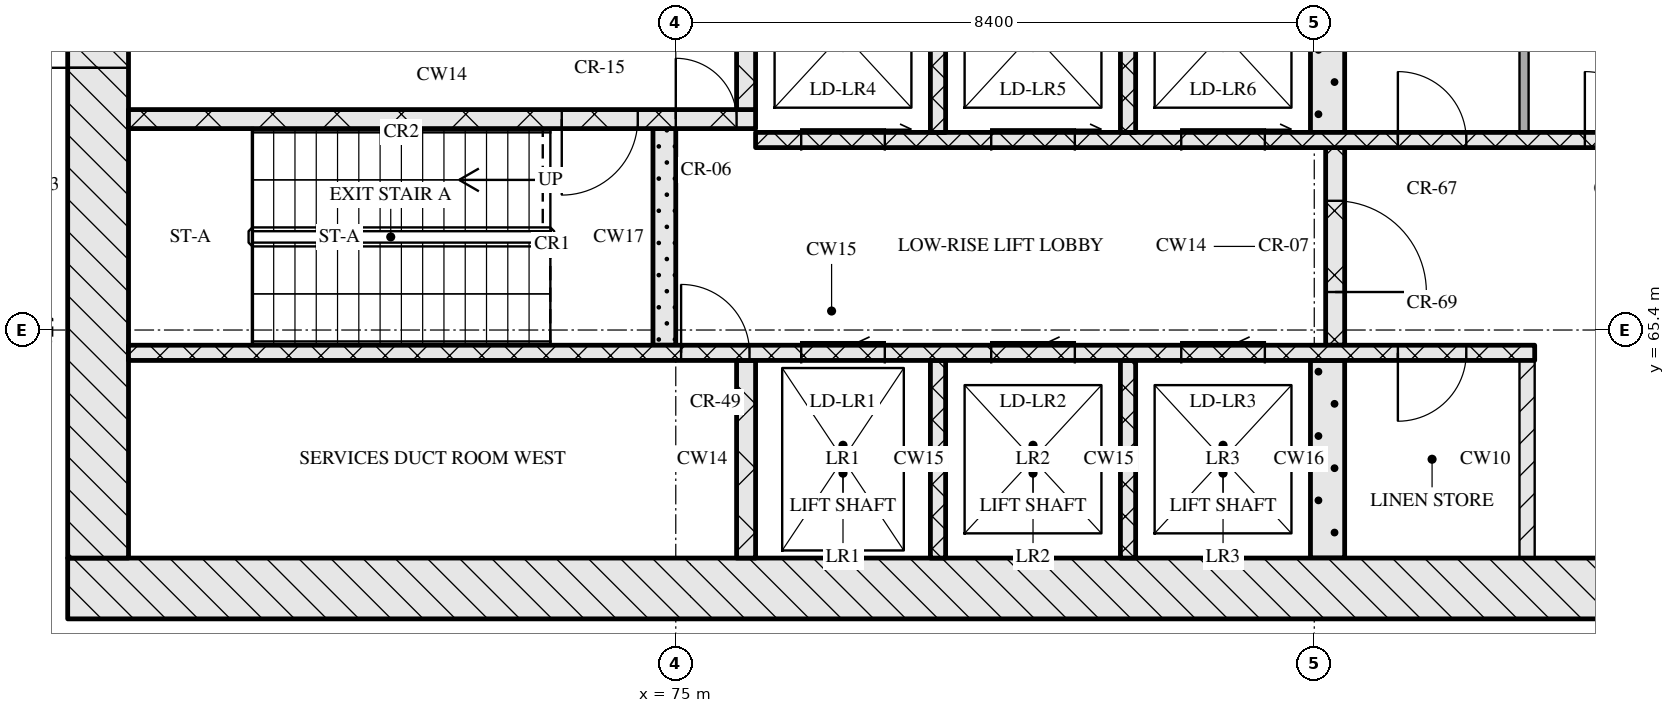
"""IFC4 building model, lengths in metres.
Left out: names, types, materials, properties, quantities, classifications, styles, units other than length and angle.
Written with IfcOpenShell. Run it as: python <this file> out.ifc"""

import sys

from ifc_helpers import new_model, si_unit, direction, frame, frame_2d, origin, place, context, subcontext, project, spatial, rectangle, extrude, element, fill, save


model = new_model("IFC4")
c1 = context("Model", 3, precision=1e-05, world=origin(), true_north=direction((0.0, 1.0)))
c2 = subcontext(c1, "Body", "Model", "MODEL_VIEW")
j1 = project(units=[si_unit("LENGTHUNIT", "METRE"), si_unit("PLANEANGLEUNIT", "RADIAN")], contexts=[c1])
p1 = place(None, origin())
s1 = spatial("IfcSite", under=j1, at=p1, CompositionType="ELEMENT")
p2 = place(p1, origin())
s2 = spatial("IfcBuilding", under=s1, at=p2, CompositionType="ELEMENT")
p3 = place(p2, frame((0.0, 0.0, 142.05)))
s3 = spatial("IfcBuildingStorey", under=s2, at=p3, CompositionType="ELEMENT", Elevation=142.05)
p4 = place(p3, frame((67.0, 62.0, 0.0), z_axis=(0.0, 0.0, 1.0), x_axis=(1.0, 0.0, 0.0)))
e1 = element("IfcWall", 1, at=p4, inside=s3, PredefinedType="SOLIDWALL", context=c2, shape_type="SweptSolid", body=[
    extrude(rectangle(XDim=41.2, YDim=0.8, at=frame_2d((20.6, 0.0))), origin(), (0.0, 0.0, 1.0), 5.12),
])
p5 = place(p4, frame((20.95, 0.0, 0.0)))
e2 = element("IfcOpeningElement", 2, at=p5, cuts=e1, PredefinedType="OPENING", context=c2, shape_type="SweptSolid", body=[
    extrude(rectangle(XDim=1.8, YDim=2.1, at=frame_2d((0.9, 1.05))), frame((0.0, 0.41, 0.0), z_axis=(0.0, -1.0, 0.0), x_axis=(1.0, 0.0, 0.0)), (0.0, 0.0, 1.0), 0.82),
])
p6 = place(p3, frame((67.4, 62.4, 0.0), z_axis=(0.0, 0.0, 1.0), x_axis=(0.0, 1.0, 0.0)))
e3 = element("IfcWall", 3, at=p6, inside=s3, PredefinedType="SOLIDWALL", context=c2, shape_type="SweptSolid", body=[
    extrude(rectangle(XDim=12.0, YDim=0.8, at=frame_2d((6.0, 0.0))), origin(), (0.0, 0.0, 1.0), 5.12),
])
p7 = place(p6, frame((6.45, 0.0, 0.0)))
e4 = element("IfcOpeningElement", 4, at=p7, cuts=e3, PredefinedType="OPENING", context=c2, shape_type="SweptSolid", body=[
    extrude(rectangle(XDim=1.2, YDim=2.1, at=frame_2d((0.6, 1.05))), frame((0.0, 0.41, 0.0), z_axis=(0.0, -1.0, 0.0), x_axis=(1.0, 0.0, 0.0)), (0.0, 0.0, 1.0), 0.82),
])
p8 = place(p3, frame((75.925, 62.4, 0.0), z_axis=(0.0, 0.0, 1.0), x_axis=(0.0, 1.0, 0.0)))
e5 = element("IfcWall", 5, at=p8, inside=s3, PredefinedType="SOLIDWALL", context=c2, shape_type="SweptSolid", body=[
    extrude(rectangle(XDim=2.6, YDim=0.25, at=frame_2d((1.3, 0.0))), origin(), (0.0, 0.0, 1.0), 5.12),
])
for number, where, z_axis, x_axis in (
    (6, (78.45, 62.4, 0.0), (0.0, 0.0, 1.0), (0.0, 1.0, 0.0)),
    (7, (80.95, 62.4, 0.0), (0.0, 0.0, 1.0), (0.0, 1.0, 0.0)),
):
    element("IfcWall", number, at=place(p3, frame(where, z_axis=z_axis, x_axis=x_axis)), inside=s3, PredefinedType="SOLIDWALL", context=c2, shape_type="SweptSolid", body=[
        extrude(rectangle(XDim=2.6, YDim=0.2, at=frame_2d((1.3, 0.0))), origin(), (0.0, 0.0, 1.0), 5.12),
    ])
p9 = place(p3, frame((83.575, 62.4, 0.0), z_axis=(0.0, 0.0, 1.0), x_axis=(0.0, 1.0, 0.0)))
e8 = element("IfcWall", 8, at=p9, inside=s3, PredefinedType="SOLIDWALL", context=c2, shape_type="SweptSolid", body=[
    extrude(rectangle(XDim=2.6, YDim=0.45, at=frame_2d((1.3, 0.0))), origin(), (0.0, 0.0, 1.0), 5.12),
])
p10 = place(p3, frame((86.2, 62.4, 0.0), z_axis=(0.0, 0.0, 1.0), x_axis=(0.0, 1.0, 0.0)))
e9 = element("IfcWall", 9, at=p10, inside=s3, PredefinedType="PARTITIONING", context=c2, shape_type="SweptSolid", body=[
    extrude(rectangle(XDim=2.6, YDim=0.2, at=frame_2d((1.3, 0.0))), origin(), (0.0, 0.0, 1.0), 5.12),
])
p11 = place(p3, frame((67.8, 65.1, 0.0), z_axis=(0.0, 0.0, 1.0), x_axis=(1.0, 0.0, 0.0)))
e10 = element("IfcWall", 10, at=p11, inside=s3, PredefinedType="SOLIDWALL", context=c2, shape_type="SweptSolid", body=[
    extrude(rectangle(XDim=18.5, YDim=0.2, at=frame_2d((9.25, 0.0))), origin(), (0.0, 0.0, 1.0), 5.12),
])
p12 = place(p11, frame((7.27, 0.0, 0.0)))
e11 = element("IfcOpeningElement", 11, at=p12, cuts=e10, PredefinedType="OPENING", context=c2, shape_type="SweptSolid", body=[
    extrude(rectangle(XDim=0.9, YDim=2.1, at=frame_2d((0.45, 1.05))), frame((0.0, 0.11, 0.0), z_axis=(0.0, -1.0, 0.0), x_axis=(1.0, 0.0, 0.0)), (0.0, 0.0, 1.0), 0.22),
])
p13 = place(p11, frame((8.85, 0.0, 0.0)))
e12 = element("IfcOpeningElement", 12, at=p13, cuts=e10, PredefinedType="OPENING", context=c2, shape_type="SweptSolid", body=[
    extrude(rectangle(XDim=1.1, YDim=2.1, at=frame_2d((0.55, 1.05))), frame((0.0, 0.11, 0.0), z_axis=(0.0, -1.0, 0.0), x_axis=(1.0, 0.0, 0.0)), (0.0, 0.0, 1.0), 0.22),
])
p14 = place(p11, frame((11.35, 0.0, 0.0)))
e13 = element("IfcOpeningElement", 13, at=p14, cuts=e10, PredefinedType="OPENING", context=c2, shape_type="SweptSolid", body=[
    extrude(rectangle(XDim=1.1, YDim=2.1, at=frame_2d((0.55, 1.05))), frame((0.0, 0.11, 0.0), z_axis=(0.0, -1.0, 0.0), x_axis=(1.0, 0.0, 0.0)), (0.0, 0.0, 1.0), 0.22),
])
p15 = place(p11, frame((13.85, 0.0, 0.0)))
e14 = element("IfcOpeningElement", 14, at=p15, cuts=e10, PredefinedType="OPENING", context=c2, shape_type="SweptSolid", body=[
    extrude(rectangle(XDim=1.1, YDim=2.1, at=frame_2d((0.55, 1.05))), frame((0.0, 0.11, 0.0), z_axis=(0.0, -1.0, 0.0), x_axis=(1.0, 0.0, 0.0)), (0.0, 0.0, 1.0), 0.22),
])
p16 = place(p11, frame((16.7, 0.0, 0.0)))
e15 = element("IfcOpeningElement", 15, at=p16, cuts=e10, PredefinedType="OPENING", context=c2, shape_type="SweptSolid", body=[
    extrude(rectangle(XDim=0.9, YDim=2.1, at=frame_2d((0.45, 1.05))), frame((0.0, 0.11, 0.0), z_axis=(0.0, -1.0, 0.0), x_axis=(1.0, 0.0, 0.0)), (0.0, 0.0, 1.0), 0.22),
])
p17 = place(p3, frame((74.85, 65.2, 0.0), z_axis=(0.0, 0.0, 1.0), x_axis=(0.0, 1.0, 0.0)))
e16 = element("IfcWall", 16, at=p17, inside=s3, PredefinedType="SOLIDWALL", context=c2, shape_type="SweptSolid", body=[
    extrude(rectangle(XDim=2.85, YDim=0.3, at=frame_2d((1.425, 0.0))), origin(), (0.0, 0.0, 1.0), 5.12),
])
p18 = place(p3, frame((83.675, 65.2, 0.0), z_axis=(0.0, 0.0, 1.0), x_axis=(0.0, 1.0, 0.0)))
e17 = element("IfcWall", 17, at=p18, inside=s3, PredefinedType="SOLIDWALL", context=c2, shape_type="SweptSolid", body=[
    extrude(rectangle(XDim=2.6, YDim=0.25, at=frame_2d((1.3, 0.0))), origin(), (0.0, 0.0, 1.0), 5.12),
])
p19 = place(p18, frame((0.7, 0.0, 0.0)))
e18 = element("IfcOpeningElement", 18, at=p19, cuts=e17, PredefinedType="OPENING", context=c2, shape_type="SweptSolid", body=[
    extrude(rectangle(XDim=1.2, YDim=2.1, at=frame_2d((0.6, 1.05))), frame((0.0, 0.135, 0.0), z_axis=(0.0, -1.0, 0.0), x_axis=(1.0, 0.0, 0.0)), (0.0, 0.0, 1.0), 0.27),
])
p20 = place(p3, frame((76.05, 67.9, 0.0), z_axis=(0.0, 0.0, 1.0), x_axis=(1.0, 0.0, 0.0)))
e19 = element("IfcWall", 19, at=p20, inside=s3, PredefinedType="SOLIDWALL", context=c2, shape_type="SweptSolid", body=[
    extrude(rectangle(XDim=23.1, YDim=0.2, at=frame_2d((11.55, 0.0))), origin(), (0.0, 0.0, 1.0), 5.12),
])
p21 = place(p20, frame((0.6, 0.0, 0.0)))
e20 = element("IfcOpeningElement", 20, at=p21, cuts=e19, PredefinedType="OPENING", context=c2, shape_type="SweptSolid", body=[
    extrude(rectangle(XDim=1.1, YDim=2.1, at=frame_2d((0.55, 1.05))), frame((0.0, 0.11, 0.0), z_axis=(0.0, -1.0, 0.0), x_axis=(1.0, 0.0, 0.0)), (0.0, 0.0, 1.0), 0.22),
])
p22 = place(p20, frame((3.1, 0.0, 0.0)))
e21 = element("IfcOpeningElement", 21, at=p22, cuts=e19, PredefinedType="OPENING", context=c2, shape_type="SweptSolid", body=[
    extrude(rectangle(XDim=1.1, YDim=2.1, at=frame_2d((0.55, 1.05))), frame((0.0, 0.11, 0.0), z_axis=(0.0, -1.0, 0.0), x_axis=(1.0, 0.0, 0.0)), (0.0, 0.0, 1.0), 0.22),
])
p23 = place(p20, frame((5.6, 0.0, 0.0)))
e22 = element("IfcOpeningElement", 22, at=p23, cuts=e19, PredefinedType="OPENING", context=c2, shape_type="SweptSolid", body=[
    extrude(rectangle(XDim=1.1, YDim=2.1, at=frame_2d((0.55, 1.05))), frame((0.0, 0.11, 0.0), z_axis=(0.0, -1.0, 0.0), x_axis=(1.0, 0.0, 0.0)), (0.0, 0.0, 1.0), 0.22),
])
p24 = place(p20, frame((8.45, 0.0, 0.0)))
e23 = element("IfcOpeningElement", 23, at=p24, cuts=e19, PredefinedType="OPENING", context=c2, shape_type="SweptSolid", body=[
    extrude(rectangle(XDim=0.9, YDim=2.1, at=frame_2d((0.45, 1.05))), frame((0.0, 0.11, 0.0), z_axis=(0.0, -1.0, 0.0), x_axis=(1.0, 0.0, 0.0)), (0.0, 0.0, 1.0), 0.22),
])
p25 = place(p20, frame((10.91, 0.0, 0.0)))
e24 = element("IfcOpeningElement", 24, at=p25, cuts=e19, PredefinedType="OPENING", context=c2, shape_type="SweptSolid", body=[
    extrude(rectangle(XDim=0.9, YDim=2.1, at=frame_2d((0.45, 1.05))), frame((0.0, 0.11, 0.0), z_axis=(0.0, -1.0, 0.0), x_axis=(1.0, 0.0, 0.0)), (0.0, 0.0, 1.0), 0.22),
])
p26 = place(p20, frame((13.55, 0.0, 0.0)))
e25 = element("IfcOpeningElement", 25, at=p26, cuts=e19, PredefinedType="OPENING", context=c2, shape_type="SweptSolid", body=[
    extrude(rectangle(XDim=1.0, YDim=2.1, at=frame_2d((0.5, 1.05))), frame((0.0, 0.11, 0.0), z_axis=(0.0, -1.0, 0.0), x_axis=(1.0, 0.0, 0.0)), (0.0, 0.0, 1.0), 0.22),
])
p27 = place(p20, frame((16.2, 0.0, 0.0)))
e26 = element("IfcOpeningElement", 26, at=p27, cuts=e19, PredefinedType="OPENING", context=c2, shape_type="SweptSolid", body=[
    extrude(rectangle(XDim=1.1, YDim=2.1, at=frame_2d((0.55, 1.05))), frame((0.0, 0.11, 0.0), z_axis=(0.0, -1.0, 0.0), x_axis=(1.0, 0.0, 0.0)), (0.0, 0.0, 1.0), 0.22),
])
p28 = place(p20, frame((18.7, 0.0, 0.0)))
e27 = element("IfcOpeningElement", 27, at=p28, cuts=e19, PredefinedType="OPENING", context=c2, shape_type="SweptSolid", body=[
    extrude(rectangle(XDim=1.1, YDim=2.1, at=frame_2d((0.55, 1.05))), frame((0.0, 0.11, 0.0), z_axis=(0.0, -1.0, 0.0), x_axis=(1.0, 0.0, 0.0)), (0.0, 0.0, 1.0), 0.22),
])
p29 = place(p20, frame((21.2, 0.0, 0.0)))
e28 = element("IfcOpeningElement", 28, at=p29, cuts=e19, PredefinedType="OPENING", context=c2, shape_type="SweptSolid", body=[
    extrude(rectangle(XDim=1.1, YDim=2.1, at=frame_2d((0.55, 1.05))), frame((0.0, 0.11, 0.0), z_axis=(0.0, -1.0, 0.0), x_axis=(1.0, 0.0, 0.0)), (0.0, 0.0, 1.0), 0.22),
])
for number, where, z_axis, x_axis in (
    (29, (78.45, 68.0, 0.0), (0.0, 0.0, 1.0), (0.0, 1.0, 0.0)),
    (30, (80.95, 68.0, 0.0), (0.0, 0.0, 1.0), (0.0, 1.0, 0.0)),
):
    element("IfcWall", number, at=place(p3, frame(where, z_axis=z_axis, x_axis=x_axis)), inside=s3, PredefinedType="SOLIDWALL", context=c2, shape_type="SweptSolid", body=[
        extrude(rectangle(XDim=2.6, YDim=0.2, at=frame_2d((1.3, 0.0))), origin(), (0.0, 0.0, 1.0), 5.12),
    ])
p30 = place(p3, frame((83.575, 68.0, 0.0), z_axis=(0.0, 0.0, 1.0), x_axis=(0.0, 1.0, 0.0)))
e31 = element("IfcWall", 31, at=p30, inside=s3, PredefinedType="SOLIDWALL", context=c2, shape_type="SweptSolid", body=[
    extrude(rectangle(XDim=2.6, YDim=0.45, at=frame_2d((1.3, 0.0))), origin(), (0.0, 0.0, 1.0), 5.12),
])
p31 = place(p3, frame((86.16, 68.0, 0.0), z_axis=(0.0, 0.0, 1.0), x_axis=(0.0, 1.0, 0.0)))
e32 = element("IfcWall", 32, at=p31, inside=s3, PredefinedType="PARTITIONING", context=c2, shape_type="SweptSolid", body=[
    extrude(rectangle(XDim=2.6, YDim=0.12, at=frame_2d((1.3, 0.0))), origin(), (0.0, 0.0, 1.0), 5.12),
])
p32 = place(p3, frame((67.8, 68.175, 0.0), z_axis=(0.0, 0.0, 1.0), x_axis=(1.0, 0.0, 0.0)))
e33 = element("IfcWall", 33, at=p32, inside=s3, PredefinedType="SOLIDWALL", context=c2, shape_type="SweptSolid", body=[
    extrude(rectangle(XDim=8.25, YDim=0.25, at=frame_2d((4.125, 0.0))), origin(), (0.0, 0.0, 1.0), 5.12),
])
p33 = place(p32, frame((5.7, 0.0, 0.0)))
e34 = element("IfcOpeningElement", 34, at=p33, cuts=e33, PredefinedType="OPENING", context=c2, shape_type="SweptSolid", body=[
    extrude(rectangle(XDim=1.0, YDim=2.1, at=frame_2d((0.5, 1.05))), frame((0.0, 0.135, 0.0), z_axis=(0.0, -1.0, 0.0), x_axis=(1.0, 0.0, 0.0)), (0.0, 0.0, 1.0), 0.27),
])
p34 = place(p32, frame((7.2, 0.0, 0.0)))
e35 = element("IfcOpeningElement", 35, at=p34, cuts=e33, PredefinedType="OPENING", context=c2, shape_type="SweptSolid", body=[
    extrude(rectangle(XDim=0.8, YDim=2.1, at=frame_2d((0.4, 1.05))), frame((0.0, 0.135, 0.0), z_axis=(0.0, -1.0, 0.0), x_axis=(1.0, 0.0, 0.0)), (0.0, 0.0, 1.0), 0.27),
])
p35 = place(p3, frame((75.925, 68.3, 0.0), z_axis=(0.0, 0.0, 1.0), x_axis=(0.0, 1.0, 0.0)))
e36 = element("IfcWall", 36, at=p35, inside=s3, PredefinedType="SOLIDWALL", context=c2, shape_type="SweptSolid", body=[
    extrude(rectangle(XDim=2.3, YDim=0.25, at=frame_2d((1.15, 0.0))), origin(), (0.0, 0.0, 1.0), 5.12),
])
p36 = place(p12, origin())
e37 = element("IfcDoor", 37, at=p36, inside=s3, OperationType="SINGLE_SWING_LEFT", PredefinedType="DOOR", context=c2, shape_type="SweptSolid", body=[
    extrude(rectangle(XDim=0.9, YDim=2.1, at=frame_2d((0.45, 1.05))), frame((0.0, 0.025, 0.0), z_axis=(0.0, -1.0, 0.0), x_axis=(1.0, 0.0, 0.0)), (0.0, 0.0, 1.0), 0.05),
])
fill(e11, e37)
p37 = place(p13, origin())
e38 = element("IfcDoor", 38, at=p37, inside=s3, OperationType="SLIDING_TO_LEFT", PredefinedType="DOOR", context=c2, shape_type="SweptSolid", body=[
    extrude(rectangle(XDim=1.1, YDim=2.1, at=frame_2d((0.55, 1.05))), frame((0.0, 0.025, 0.0), z_axis=(0.0, -1.0, 0.0), x_axis=(1.0, 0.0, 0.0)), (0.0, 0.0, 1.0), 0.05),
])
fill(e12, e38)
p38 = place(p14, origin())
e39 = element("IfcDoor", 39, at=p38, inside=s3, OperationType="SLIDING_TO_LEFT", PredefinedType="DOOR", context=c2, shape_type="SweptSolid", body=[
    extrude(rectangle(XDim=1.1, YDim=2.1, at=frame_2d((0.55, 1.05))), frame((0.0, 0.025, 0.0), z_axis=(0.0, -1.0, 0.0), x_axis=(1.0, 0.0, 0.0)), (0.0, 0.0, 1.0), 0.05),
])
fill(e13, e39)
p39 = place(p15, origin())
e40 = element("IfcDoor", 40, at=p39, inside=s3, OperationType="SLIDING_TO_LEFT", PredefinedType="DOOR", context=c2, shape_type="SweptSolid", body=[
    extrude(rectangle(XDim=1.1, YDim=2.1, at=frame_2d((0.55, 1.05))), frame((0.0, 0.025, 0.0), z_axis=(0.0, -1.0, 0.0), x_axis=(1.0, 0.0, 0.0)), (0.0, 0.0, 1.0), 0.05),
])
fill(e14, e40)
p40 = place(p16, origin())
e41 = element("IfcDoor", 41, at=p40, inside=s3, OperationType="SINGLE_SWING_RIGHT", PredefinedType="DOOR", context=c2, shape_type="SweptSolid", body=[
    extrude(rectangle(XDim=0.9, YDim=2.1, at=frame_2d((0.45, 1.05))), frame((0.0, 0.025, 0.0), z_axis=(0.0, -1.0, 0.0), x_axis=(1.0, 0.0, 0.0)), (0.0, 0.0, 1.0), 0.05),
])
fill(e15, e41)
p41 = place(p19, origin())
e42 = element("IfcDoor", 42, at=p41, inside=s3, OperationType="SINGLE_SWING_RIGHT", PredefinedType="DOOR", context=c2, shape_type="SweptSolid", body=[
    extrude(rectangle(XDim=1.2, YDim=2.1, at=frame_2d((0.6, 1.05))), frame((0.0, 0.025, 0.0), z_axis=(0.0, -1.0, 0.0), x_axis=(1.0, 0.0, 0.0)), (0.0, 0.0, 1.0), 0.05),
])
fill(e18, e42)
p42 = place(p21, origin())
e43 = element("IfcDoor", 43, at=p42, inside=s3, OperationType="SLIDING_TO_RIGHT", PredefinedType="DOOR", context=c2, shape_type="SweptSolid", body=[
    extrude(rectangle(XDim=1.1, YDim=2.1, at=frame_2d((0.55, 1.05))), frame((0.0, 0.025, 0.0), z_axis=(0.0, -1.0, 0.0), x_axis=(1.0, 0.0, 0.0)), (0.0, 0.0, 1.0), 0.05),
])
fill(e20, e43)
p43 = place(p22, origin())
e44 = element("IfcDoor", 44, at=p43, inside=s3, OperationType="SLIDING_TO_RIGHT", PredefinedType="DOOR", context=c2, shape_type="SweptSolid", body=[
    extrude(rectangle(XDim=1.1, YDim=2.1, at=frame_2d((0.55, 1.05))), frame((0.0, 0.025, 0.0), z_axis=(0.0, -1.0, 0.0), x_axis=(1.0, 0.0, 0.0)), (0.0, 0.0, 1.0), 0.05),
])
fill(e21, e44)
p44 = place(p23, origin())
e45 = element("IfcDoor", 45, at=p44, inside=s3, OperationType="SLIDING_TO_RIGHT", PredefinedType="DOOR", context=c2, shape_type="SweptSolid", body=[
    extrude(rectangle(XDim=1.1, YDim=2.1, at=frame_2d((0.55, 1.05))), frame((0.0, 0.025, 0.0), z_axis=(0.0, -1.0, 0.0), x_axis=(1.0, 0.0, 0.0)), (0.0, 0.0, 1.0), 0.05),
])
fill(e22, e45)
p45 = place(p24, origin())
e46 = element("IfcDoor", 46, at=p45, inside=s3, OperationType="SINGLE_SWING_LEFT", PredefinedType="DOOR", context=c2, shape_type="SweptSolid", body=[
    extrude(rectangle(XDim=0.9, YDim=2.1, at=frame_2d((0.45, 1.05))), frame((0.0, 0.025, 0.0), z_axis=(0.0, -1.0, 0.0), x_axis=(1.0, 0.0, 0.0)), (0.0, 0.0, 1.0), 0.05),
])
fill(e23, e46)
p46 = place(p25, origin())
e47 = element("IfcDoor", 47, at=p46, inside=s3, OperationType="SINGLE_SWING_LEFT", PredefinedType="DOOR", context=c2, shape_type="SweptSolid", body=[
    extrude(rectangle(XDim=0.9, YDim=2.1, at=frame_2d((0.45, 1.05))), frame((0.0, 0.025, 0.0), z_axis=(0.0, -1.0, 0.0), x_axis=(1.0, 0.0, 0.0)), (0.0, 0.0, 1.0), 0.05),
])
fill(e24, e47)
p47 = place(p33, origin())
e48 = element("IfcDoor", 48, at=p47, inside=s3, OperationType="SINGLE_SWING_RIGHT", PredefinedType="DOOR", context=c2, shape_type="SweptSolid", body=[
    extrude(rectangle(XDim=1.0, YDim=2.1, at=frame_2d((0.5, 1.05))), frame((0.0, 0.025, 0.0), z_axis=(0.0, -1.0, 0.0), x_axis=(1.0, 0.0, 0.0)), (0.0, 0.0, 1.0), 0.05),
])
fill(e34, e48)
p48 = place(p34, origin())
e49 = element("IfcDoor", 49, at=p48, inside=s3, OperationType="SINGLE_SWING_LEFT", PredefinedType="DOOR", context=c2, shape_type="SweptSolid", body=[
    extrude(rectangle(XDim=0.8, YDim=2.1, at=frame_2d((0.4, 1.05))), frame((0.0, 0.025, 0.0), z_axis=(0.0, -1.0, 0.0), x_axis=(1.0, 0.0, 0.0)), (0.0, 0.0, 1.0), 0.05),
])
fill(e35, e49)
p49 = place(p7, origin())
e50 = element("IfcDoor", 50, at=p49, inside=s3, OperationType="SINGLE_SWING_LEFT", PredefinedType="DOOR", context=c2, shape_type="SweptSolid", body=[
    extrude(rectangle(XDim=1.2, YDim=2.1, at=frame_2d((0.6, 1.05))), frame((0.0, 0.025, 0.0), z_axis=(0.0, -1.0, 0.0), x_axis=(1.0, 0.0, 0.0)), (0.0, 0.0, 1.0), 0.05),
])
fill(e4, e50)
save(model, sys.argv[1])
